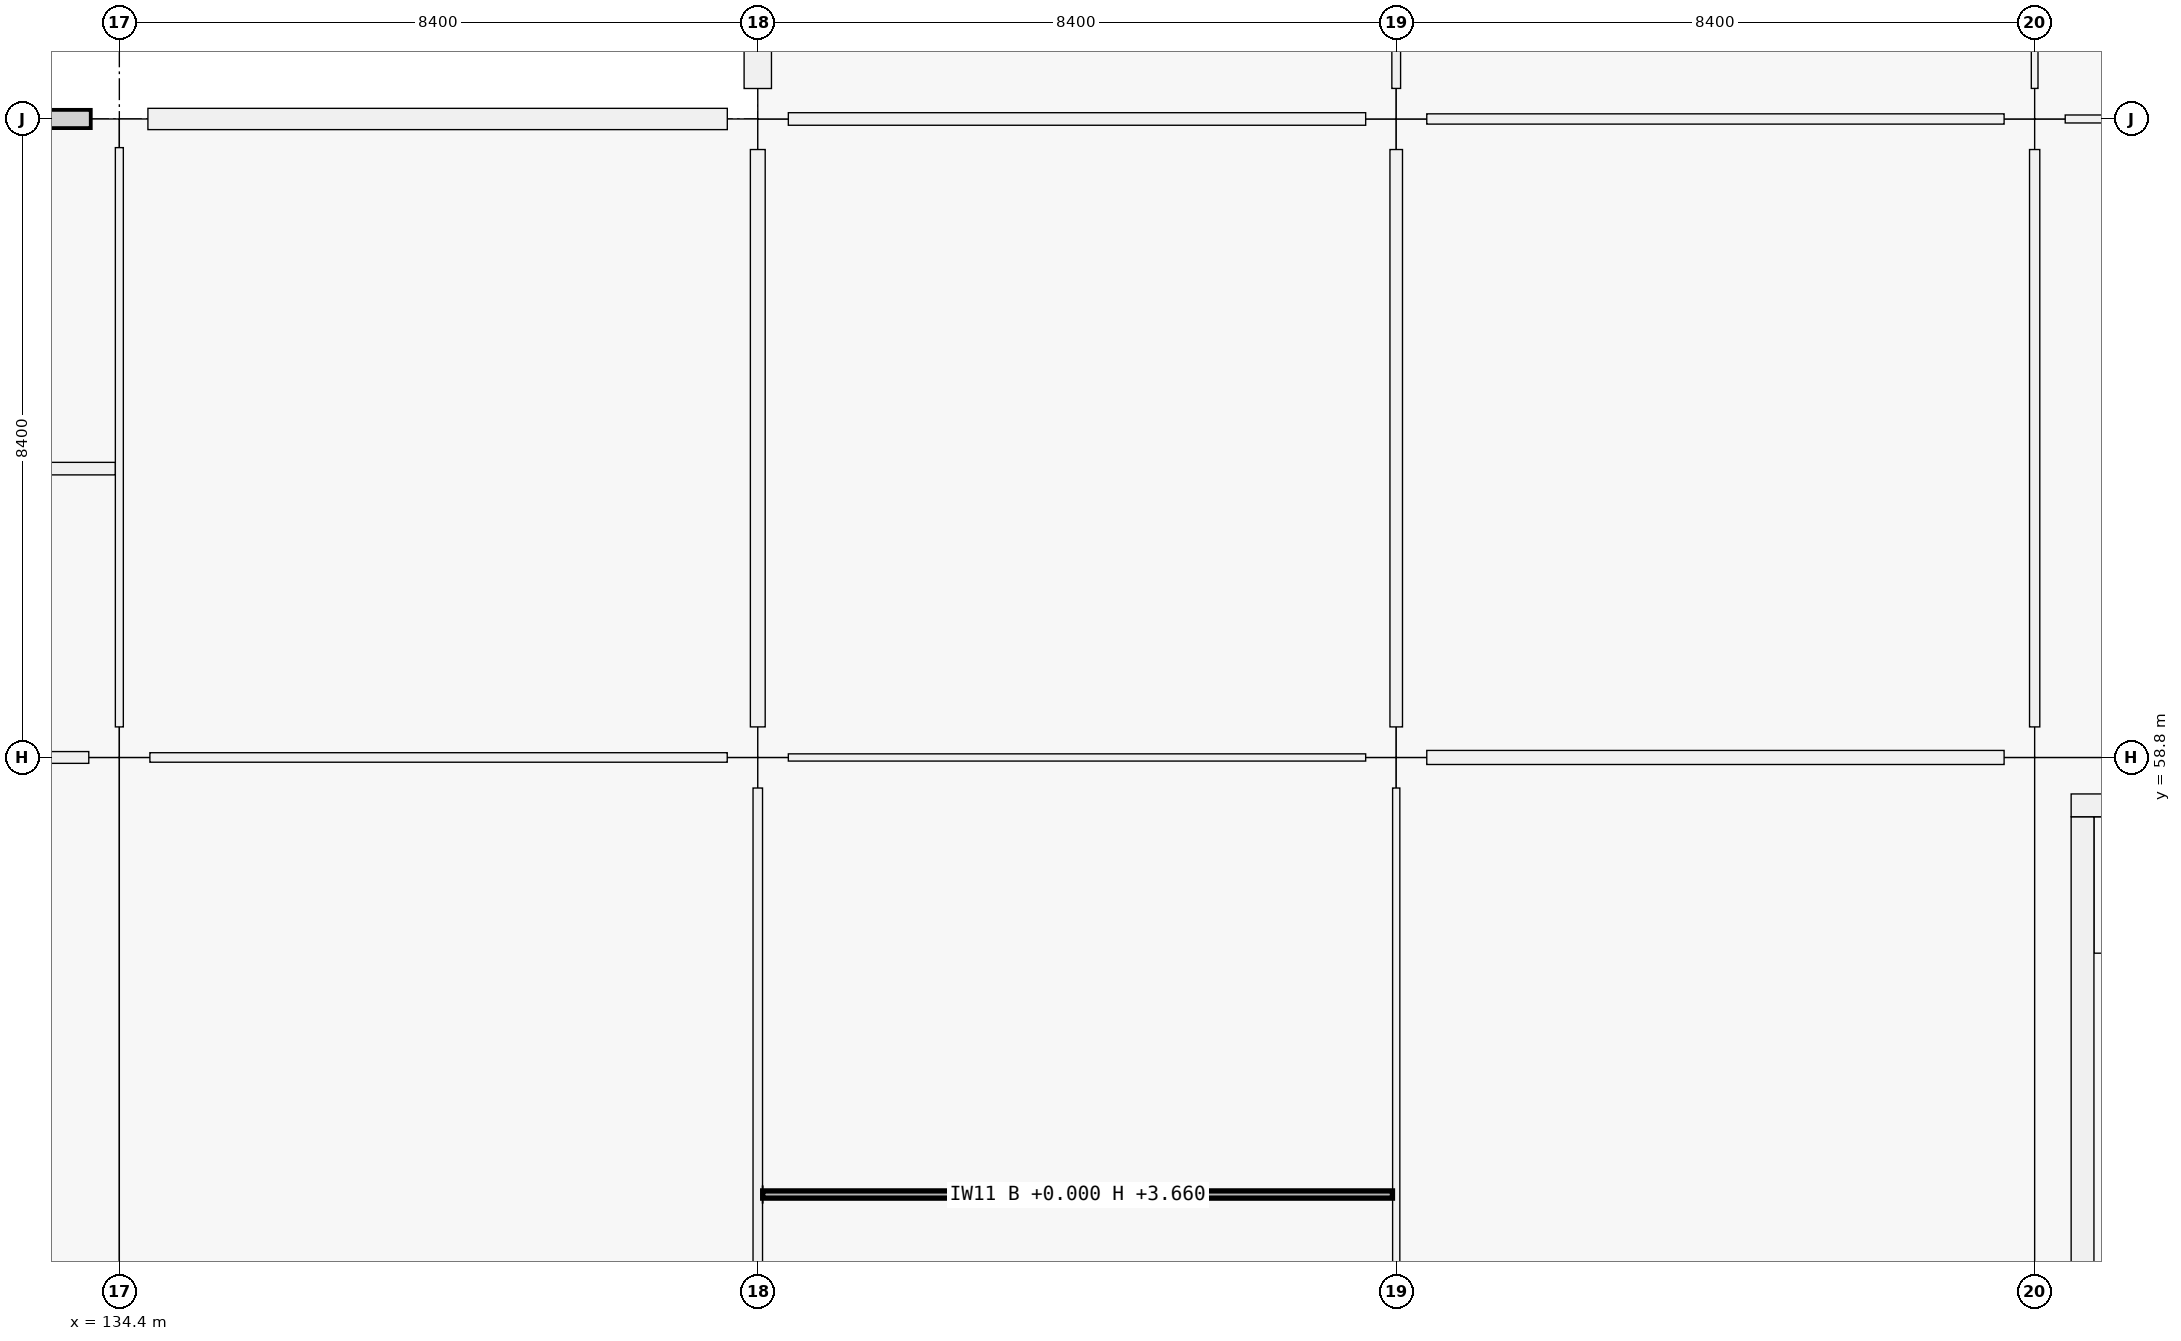
"""IFC4 building model, lengths in metres.
Left out: names, types, materials, properties, quantities, classifications, styles, units other than length and angle.
Written with IfcOpenShell. Run it as: python <this file> out.ifc"""

import sys

from ifc_helpers import new_model, si_unit, direction, frame, frame_2d, origin, origin_2d, place, context, subcontext, project, spatial, rectangle, extrude, element, fill, save


model = new_model("IFC4")
c1 = context("Model", 3, precision=1e-05, world=origin(), true_north=direction((0.0, 1.0)))
c2 = subcontext(c1, "Body", "Model", "MODEL_VIEW")
j1 = project(units=[si_unit("LENGTHUNIT", "METRE"), si_unit("PLANEANGLEUNIT", "RADIAN")], contexts=[c1])
p1 = place(None, origin())
s1 = spatial("IfcSite", under=j1, at=p1, CompositionType="ELEMENT")
p2 = place(p1, origin())
s2 = spatial("IfcBuilding", under=s1, at=p2, CompositionType="ELEMENT")
p3 = place(p2, origin())
s3 = spatial("IfcBuildingStorey", under=s2, at=p3, CompositionType="ELEMENT", Elevation=0.0)
p4 = place(p3, frame((134.4, 58.8, 0.0), z_axis=(0.0, 0.0, 1.0), x_axis=(1.0, 0.0, 0.0)))
e1 = element("IfcColumn", 1, at=p4, inside=s3, PredefinedType="COLUMN", context=c2, shape_type="SweptSolid", body=[
    extrude(rectangle(XDim=0.8, YDim=0.8, at=origin_2d()), origin(), (0.0, 0.0, 1.0), 5.76),
])
p5 = place(p3, frame((134.4, 67.2, 0.0), z_axis=(0.0, 0.0, 1.0), x_axis=(1.0, 0.0, 0.0)))
e2 = element("IfcColumn", 2, at=p5, inside=s3, PredefinedType="COLUMN", context=c2, shape_type="SweptSolid", body=[
    extrude(rectangle(XDim=0.75, YDim=0.75, at=origin_2d()), origin(), (0.0, 0.0, 1.0), 5.76),
])
for number, where, z_axis, x_axis in (
    (3, (142.8, 58.8, 0.0), (0.0, 0.0, 1.0), (1.0, 0.0, 0.0)),
    (4, (142.8, 67.2, 0.0), (0.0, 0.0, 1.0), (1.0, 0.0, 0.0)),
    (5, (151.2, 58.8, 0.0), (0.0, 0.0, 1.0), (1.0, 0.0, 0.0)),
    (6, (151.2, 67.2, 0.0), (0.0, 0.0, 1.0), (1.0, 0.0, 0.0)),
    (7, (159.6, 58.8, 0.0), (0.0, 0.0, 1.0), (1.0, 0.0, 0.0)),
    (8, (159.6, 67.2, 0.0), (0.0, 0.0, 1.0), (1.0, 0.0, 0.0)),
):
    element("IfcColumn", number, at=place(p3, frame(where, z_axis=z_axis, x_axis=x_axis)), inside=s3, PredefinedType="COLUMN", context=c2, shape_type="SweptSolid", body=[
        extrude(rectangle(XDim=0.8, YDim=0.8, at=origin_2d()), origin(), (0.0, 0.0, 1.0), 5.76),
    ])
p6 = place(p3, frame((134.776, 67.2, 0.0), z_axis=(0.0, 0.0, 1.0), x_axis=(1.0, 0.0, 0.0)))
e9 = element("IfcWall", 9, at=p6, inside=s3, PredefinedType="SOLIDWALL", context=c2, shape_type="SweptSolid", body=[
    extrude(rectangle(XDim=7.623, YDim=0.28, at=frame_2d((3.812, 0.0))), origin(), (0.0, 0.0, 1.0), 4.7),
])
p7 = place(p6, frame((2.537, 0.0, 0.9)))
e10 = element("IfcOpeningElement", 10, at=p7, cuts=e9, PredefinedType="OPENING", context=c2, shape_type="SweptSolid", body=[
    extrude(rectangle(XDim=2.55, YDim=1.95, at=frame_2d((1.275, 0.975))), frame((0.0, 0.14, 0.0), z_axis=(0.0, -1.0, 0.0), x_axis=(1.0, 0.0, 0.0)), (0.0, 0.0, 1.0), 0.28),
])
p8 = place(p3, frame((142.8, 67.601, 0.0), z_axis=(0.0, 0.0, 1.0), x_axis=(0.0, 1.0, 0.0)))
e11 = element("IfcWall", 11, at=p8, inside=s3, PredefinedType="SOLIDWALL", context=c2, shape_type="SweptSolid", body=[
    extrude(rectangle(XDim=7.673, YDim=0.36, at=frame_2d((3.836, 0.0))), origin(), (0.0, 0.0, 1.0), 4.7),
])
p9 = place(p8, frame((2.937, 0.0, 0.9)))
e12 = element("IfcOpeningElement", 12, at=p9, cuts=e11, PredefinedType="OPENING", context=c2, shape_type="SweptSolid", body=[
    extrude(rectangle(XDim=1.8, YDim=1.8, at=frame_2d((0.9, 0.9))), frame((0.0, 0.18, 0.0), z_axis=(0.0, -1.0, 0.0), x_axis=(1.0, 0.0, 0.0)), (0.0, 0.0, 1.0), 0.36),
])
p10 = place(p3, frame((160.23, 51.18, 0.0), z_axis=(0.0, 0.0, 1.0), x_axis=(0.0, 1.0, 0.0)))
e13 = element("IfcWall", 13, at=p10, inside=s3, PredefinedType="SHEAR", context=c2, shape_type="SweptSolid", body=[
    extrude(rectangle(XDim=6.84, YDim=0.3, at=frame_2d((3.42, 0.0))), origin(), (0.0, 0.0, 1.0), 5.76),
])
p11 = place(p3, frame((160.08, 58.17, 0.0), z_axis=(0.0, 0.0, 1.0), x_axis=(1.0, 0.0, 0.0)))
e14 = element("IfcWall", 14, at=p11, inside=s3, PredefinedType="SHEAR", context=c2, shape_type="SweptSolid", body=[
    extrude(rectangle(XDim=7.44, YDim=0.3, at=frame_2d((3.72, 0.0))), origin(), (0.0, 0.0, 1.0), 5.76),
])
p12 = place(p3, frame((126.402, 58.8, 0.0), z_axis=(0.0, 0.0, 1.0), x_axis=(1.0, 0.0, 0.0)))
e15 = element("IfcWall", 15, at=p12, inside=s3, PredefinedType="PARTITIONING", context=c2, shape_type="SweptSolid", body=[
    extrude(rectangle(XDim=7.596, YDim=0.155, at=frame_2d((3.798, 0.0))), origin(), (0.0, 0.0, 1.0), 3.66),
])
p13 = place(p3, frame((134.802, 58.8, 0.0), z_axis=(0.0, 0.0, 1.0), x_axis=(1.0, 0.0, 0.0)))
e16 = element("IfcWall", 16, at=p13, inside=s3, PredefinedType="PARTITIONING", context=c2, shape_type="SweptSolid", body=[
    extrude(rectangle(XDim=7.596, YDim=0.125, at=frame_2d((3.798, 0.0))), origin(), (0.0, 0.0, 1.0), 3.66),
])
p14 = place(p13, frame((3.293, 0.0, 0.0)))
e17 = element("IfcOpeningElement", 17, at=p14, cuts=e16, PredefinedType="OPENING", context=c2, shape_type="SweptSolid", body=[
    extrude(rectangle(XDim=1.01, YDim=2.12, at=frame_2d((0.505, 1.06))), frame((0.0, 0.062, 0.0), z_axis=(0.0, -1.0, 0.0), x_axis=(1.0, 0.0, 0.0)), (0.0, 0.0, 1.0), 0.125),
])
p15 = place(p3, frame((143.202, 58.8, 0.0), z_axis=(0.0, 0.0, 1.0), x_axis=(1.0, 0.0, 0.0)))
e18 = element("IfcWall", 18, at=p15, inside=s3, PredefinedType="PARTITIONING", context=c2, shape_type="SweptSolid", body=[
    extrude(rectangle(XDim=7.596, YDim=0.095, at=frame_2d((3.798, 0.0))), origin(), (0.0, 0.0, 1.0), 3.66),
])
p16 = place(p3, frame((143.202, 67.2, 0.0), z_axis=(0.0, 0.0, 1.0), x_axis=(1.0, 0.0, 0.0)))
e19 = element("IfcWall", 19, at=p16, inside=s3, PredefinedType="PARTITIONING", context=c2, shape_type="SweptSolid", body=[
    extrude(rectangle(XDim=7.596, YDim=0.165, at=frame_2d((3.798, 0.0))), origin(), (0.0, 0.0, 1.0), 3.66),
])
p17 = place(p16, frame((3.278, 0.0, 0.0)))
e20 = element("IfcOpeningElement", 20, at=p17, cuts=e19, PredefinedType="OPENING", context=c2, shape_type="SweptSolid", body=[
    extrude(rectangle(XDim=1.04, YDim=2.2, at=frame_2d((0.52, 1.1))), frame((0.0, 0.083, 0.0), z_axis=(0.0, -1.0, 0.0), x_axis=(1.0, 0.0, 0.0)), (0.0, 0.0, 1.0), 0.165),
])
p18 = place(p3, frame((151.602, 58.8, 0.0), z_axis=(0.0, 0.0, 1.0), x_axis=(1.0, 0.0, 0.0)))
e21 = element("IfcWall", 21, at=p18, inside=s3, PredefinedType="PARTITIONING", context=c2, shape_type="SweptSolid", body=[
    extrude(rectangle(XDim=7.596, YDim=0.185, at=frame_2d((3.798, 0.0))), origin(), (0.0, 0.0, 1.0), 3.66),
])
p19 = place(p18, frame((3.318, 0.0, 0.0)))
e22 = element("IfcOpeningElement", 22, at=p19, cuts=e21, PredefinedType="OPENING", context=c2, shape_type="SweptSolid", body=[
    extrude(rectangle(XDim=0.96, YDim=2.18, at=frame_2d((0.48, 1.09))), frame((0.0, 0.093, 0.0), z_axis=(0.0, -1.0, 0.0), x_axis=(1.0, 0.0, 0.0)), (0.0, 0.0, 1.0), 0.185),
])
p20 = place(p3, frame((151.602, 67.2, 0.0), z_axis=(0.0, 0.0, 1.0), x_axis=(1.0, 0.0, 0.0)))
e23 = element("IfcWall", 23, at=p20, inside=s3, PredefinedType="PARTITIONING", context=c2, shape_type="SweptSolid", body=[
    extrude(rectangle(XDim=7.596, YDim=0.135, at=frame_2d((3.798, 0.0))), origin(), (0.0, 0.0, 1.0), 3.66),
])
p21 = place(p20, frame((3.328, 0.0, 0.0)))
e24 = element("IfcOpeningElement", 24, at=p21, cuts=e23, PredefinedType="OPENING", context=c2, shape_type="SweptSolid", body=[
    extrude(rectangle(XDim=0.94, YDim=2.15, at=frame_2d((0.47, 1.075))), frame((0.0, 0.067, 0.0), z_axis=(0.0, -1.0, 0.0), x_axis=(1.0, 0.0, 0.0)), (0.0, 0.0, 1.0), 0.135),
])
p22 = place(p3, frame((160.002, 67.2, 0.0), z_axis=(0.0, 0.0, 1.0), x_axis=(1.0, 0.0, 0.0)))
e25 = element("IfcWall", 25, at=p22, inside=s3, PredefinedType="PARTITIONING", context=c2, shape_type="SweptSolid", body=[
    extrude(rectangle(XDim=7.596, YDim=0.105, at=frame_2d((3.798, 0.0))), origin(), (0.0, 0.0, 1.0), 3.66),
])
p23 = place(p22, frame((3.273, 0.0, 0.0)))
e26 = element("IfcOpeningElement", 26, at=p23, cuts=e25, PredefinedType="OPENING", context=c2, shape_type="SweptSolid", body=[
    extrude(rectangle(XDim=1.05, YDim=2.12, at=frame_2d((0.525, 1.06))), frame((0.0, 0.052, 0.0), z_axis=(0.0, -1.0, 0.0), x_axis=(1.0, 0.0, 0.0)), (0.0, 0.0, 1.0), 0.105),
])
p24 = place(p3, frame((134.4, 59.202, 0.0), z_axis=(0.0, 0.0, 1.0), x_axis=(0.0, 1.0, 0.0)))
e27 = element("IfcWall", 27, at=p24, inside=s3, PredefinedType="PARTITIONING", context=c2, shape_type="SweptSolid", body=[
    extrude(rectangle(XDim=7.621, YDim=0.105, at=frame_2d((3.811, 0.0))), origin(), (0.0, 0.0, 1.0), 3.66),
])
p25 = place(p3, frame((142.8, 50.802, 0.0), z_axis=(0.0, 0.0, 1.0), x_axis=(0.0, 1.0, 0.0)))
e28 = element("IfcWall", 28, at=p25, inside=s3, PredefinedType="PARTITIONING", context=c2, shape_type="SweptSolid", body=[
    extrude(rectangle(XDim=7.596, YDim=0.125, at=frame_2d((3.798, 0.0))), origin(), (0.0, 0.0, 1.0), 3.66),
])
p26 = place(p25, frame((0.593, 0.0, 0.0)))
e29 = element("IfcOpeningElement", 29, at=p26, cuts=e28, PredefinedType="OPENING", context=c2, shape_type="SweptSolid", body=[
    extrude(rectangle(XDim=0.94, YDim=2.08, at=frame_2d((0.47, 1.04))), frame((0.0, 0.062, 0.0), z_axis=(0.0, -1.0, 0.0), x_axis=(1.0, 0.0, 0.0)), (0.0, 0.0, 1.0), 0.125),
])
p27 = place(p25, frame((4.503, 0.0, 0.0)))
e30 = element("IfcOpeningElement", 30, at=p27, cuts=e28, PredefinedType="OPENING", context=c2, shape_type="SweptSolid", body=[
    extrude(rectangle(XDim=0.96, YDim=2.1, at=frame_2d((0.48, 1.05))), frame((0.0, 0.062, 0.0), z_axis=(0.0, -1.0, 0.0), x_axis=(1.0, 0.0, 0.0)), (0.0, 0.0, 1.0), 0.125),
])
p28 = place(p3, frame((142.8, 59.202, 0.0), z_axis=(0.0, 0.0, 1.0), x_axis=(0.0, 1.0, 0.0)))
e31 = element("IfcWall", 31, at=p28, inside=s3, PredefinedType="PARTITIONING", context=c2, shape_type="SweptSolid", body=[
    extrude(rectangle(XDim=7.596, YDim=0.195, at=frame_2d((3.798, 0.0))), origin(), (0.0, 0.0, 1.0), 3.66),
])
p29 = place(p28, frame((3.268, 0.0, 0.0)))
e32 = element("IfcOpeningElement", 32, at=p29, cuts=e31, PredefinedType="OPENING", context=c2, shape_type="SweptSolid", body=[
    extrude(rectangle(XDim=1.06, YDim=2.25, at=frame_2d((0.53, 1.125))), frame((0.0, 0.098, 0.0), z_axis=(0.0, -1.0, 0.0), x_axis=(1.0, 0.0, 0.0)), (0.0, 0.0, 1.0), 0.195),
])
p30 = place(p3, frame((151.2, 50.802, 0.0), z_axis=(0.0, 0.0, 1.0), x_axis=(0.0, 1.0, 0.0)))
e33 = element("IfcWall", 33, at=p30, inside=s3, PredefinedType="PARTITIONING", context=c2, shape_type="SweptSolid", body=[
    extrude(rectangle(XDim=7.596, YDim=0.095, at=frame_2d((3.798, 0.0))), origin(), (0.0, 0.0, 1.0), 3.66),
])
p31 = place(p3, frame((151.2, 59.202, 0.0), z_axis=(0.0, 0.0, 1.0), x_axis=(0.0, 1.0, 0.0)))
e34 = element("IfcWall", 34, at=p31, inside=s3, PredefinedType="PARTITIONING", context=c2, shape_type="SweptSolid", body=[
    extrude(rectangle(XDim=7.596, YDim=0.165, at=frame_2d((3.798, 0.0))), origin(), (0.0, 0.0, 1.0), 3.66),
])
p32 = place(p31, frame((3.318, 0.0, 0.0)))
e35 = element("IfcOpeningElement", 35, at=p32, cuts=e34, PredefinedType="OPENING", context=c2, shape_type="SweptSolid", body=[
    extrude(rectangle(XDim=0.96, YDim=2.18, at=frame_2d((0.48, 1.09))), frame((0.0, 0.083, 0.0), z_axis=(0.0, -1.0, 0.0), x_axis=(1.0, 0.0, 0.0)), (0.0, 0.0, 1.0), 0.165),
])
p33 = place(p3, frame((151.2, 67.602, 0.0), z_axis=(0.0, 0.0, 1.0), x_axis=(0.0, 1.0, 0.0)))
e36 = element("IfcWall", 36, at=p33, inside=s3, PredefinedType="PARTITIONING", context=c2, shape_type="SweptSolid", body=[
    extrude(rectangle(XDim=7.696, YDim=0.115, at=frame_2d((3.848, 0.0))), origin(), (0.0, 0.0, 1.0), 3.66),
])
p34 = place(p33, frame((3.378, 0.0, 0.0)))
e37 = element("IfcOpeningElement", 37, at=p34, cuts=e36, PredefinedType="OPENING", context=c2, shape_type="SweptSolid", body=[
    extrude(rectangle(XDim=0.94, YDim=2.15, at=frame_2d((0.47, 1.075))), frame((0.0, 0.058, 0.0), z_axis=(0.0, -1.0, 0.0), x_axis=(1.0, 0.0, 0.0)), (0.0, 0.0, 1.0), 0.115),
])
p35 = place(p3, frame((159.6, 59.202, 0.0), z_axis=(0.0, 0.0, 1.0), x_axis=(0.0, 1.0, 0.0)))
e38 = element("IfcWall", 38, at=p35, inside=s3, PredefinedType="PARTITIONING", context=c2, shape_type="SweptSolid", body=[
    extrude(rectangle(XDim=7.596, YDim=0.135, at=frame_2d((3.798, 0.0))), origin(), (0.0, 0.0, 1.0), 3.66),
])
p36 = place(p35, frame((3.288, 0.0, 0.0)))
e39 = element("IfcOpeningElement", 39, at=p36, cuts=e38, PredefinedType="OPENING", context=c2, shape_type="SweptSolid", body=[
    extrude(rectangle(XDim=1.02, YDim=2.2, at=frame_2d((0.51, 1.1))), frame((0.0, 0.067, 0.0), z_axis=(0.0, -1.0, 0.0), x_axis=(1.0, 0.0, 0.0)), (0.0, 0.0, 1.0), 0.135),
])
p37 = place(p3, frame((159.6, 67.602, 0.0), z_axis=(0.0, 0.0, 1.0), x_axis=(0.0, 1.0, 0.0)))
e40 = element("IfcWall", 40, at=p37, inside=s3, PredefinedType="PARTITIONING", context=c2, shape_type="SweptSolid", body=[
    extrude(rectangle(XDim=7.671, YDim=0.088, at=frame_2d((3.835, 0.0))), origin(), (0.0, 0.0, 1.0), 3.66),
])
p38 = place(p37, frame((3.331, 0.0, 0.0)))
e41 = element("IfcOpeningElement", 41, at=p38, cuts=e40, PredefinedType="OPENING", context=c2, shape_type="SweptSolid", body=[
    extrude(rectangle(XDim=1.01, YDim=2.12, at=frame_2d((0.505, 1.06))), frame((0.0, 0.044, 0.0), z_axis=(0.0, -1.0, 0.0), x_axis=(1.0, 0.0, 0.0)), (0.0, 0.0, 1.0), 0.088),
])
p39 = place(p3, frame((126.07, 62.6, 0.0), z_axis=(0.0, 0.0, 1.0), x_axis=(1.0, 0.0, 0.0)))
e42 = element("IfcWall", 42, at=p39, inside=s3, PredefinedType="PARTITIONING", context=c2, shape_type="SweptSolid", body=[
    extrude(rectangle(XDim=8.276, YDim=0.165, at=frame_2d((4.138, 0.0))), origin(), (0.0, 0.0, 1.0), 3.66),
])
p40 = place(p3, frame((142.865, 53.05, 0.0), z_axis=(0.0, 0.0, 1.0), x_axis=(1.0, 0.0, 0.0)))
e43 = element("IfcWall", 43, at=p40, inside=s3, PredefinedType="PARTITIONING", context=c2, shape_type="SweptSolid", body=[
    extrude(rectangle(XDim=8.286, YDim=0.095, at=frame_2d((4.143, 0.0))), origin(), (0.0, 0.0, 1.0), 3.66),
])
p41 = place(p7, origin())
e44 = element("IfcWindow", 44, at=p41, inside=s3, PartitioningType="SINGLE_PANEL", PredefinedType="WINDOW", context=c2, shape_type="SweptSolid", body=[
    extrude(rectangle(XDim=2.55, YDim=1.95, at=frame_2d((1.275, 0.975))), frame((0.0, 0.03, 0.0), z_axis=(0.0, -1.0, 0.0), x_axis=(1.0, 0.0, 0.0)), (0.0, 0.0, 1.0), 0.06),
])
fill(e10, e44)
p42 = place(p26, origin())
e45 = element("IfcDoor", 45, at=p42, inside=s3, OperationType="SINGLE_SWING_LEFT", PredefinedType="DOOR", context=c2, shape_type="SweptSolid", body=[
    extrude(rectangle(XDim=0.94, YDim=2.08, at=frame_2d((0.47, 1.04))), frame((0.0, 0.025, 0.0), z_axis=(0.0, -1.0, 0.0), x_axis=(1.0, 0.0, 0.0)), (0.0, 0.0, 1.0), 0.05),
])
fill(e29, e45)
p43 = place(p27, origin())
e46 = element("IfcDoor", 46, at=p43, inside=s3, OperationType="SINGLE_SWING_RIGHT", PredefinedType="DOOR", context=c2, shape_type="SweptSolid", body=[
    extrude(rectangle(XDim=0.96, YDim=2.1, at=frame_2d((0.48, 1.05))), frame((0.0, 0.025, 0.0), z_axis=(0.0, -1.0, 0.0), x_axis=(1.0, 0.0, 0.0)), (0.0, 0.0, 1.0), 0.05),
])
fill(e30, e46)
p44 = place(p14, origin())
e47 = element("IfcDoor", 47, at=p44, inside=s3, OperationType="SINGLE_SWING_LEFT", PredefinedType="DOOR", context=c2, shape_type="SweptSolid", body=[
    extrude(rectangle(XDim=1.01, YDim=2.12, at=frame_2d((0.505, 1.06))), frame((0.0, 0.025, 0.0), z_axis=(0.0, -1.0, 0.0), x_axis=(1.0, 0.0, 0.0)), (0.0, 0.0, 1.0), 0.05),
])
fill(e17, e47)
p45 = place(p17, origin())
e48 = element("IfcDoor", 48, at=p45, inside=s3, OperationType="SINGLE_SWING_LEFT", PredefinedType="DOOR", context=c2, shape_type="SweptSolid", body=[
    extrude(rectangle(XDim=1.04, YDim=2.2, at=frame_2d((0.52, 1.1))), frame((0.0, 0.025, 0.0), z_axis=(0.0, -1.0, 0.0), x_axis=(1.0, 0.0, 0.0)), (0.0, 0.0, 1.0), 0.05),
])
fill(e20, e48)
p46 = place(p19, origin())
e49 = element("IfcDoor", 49, at=p46, inside=s3, OperationType="SINGLE_SWING_LEFT", PredefinedType="DOOR", context=c2, shape_type="SweptSolid", body=[
    extrude(rectangle(XDim=0.96, YDim=2.18, at=frame_2d((0.48, 1.09))), frame((0.0, 0.025, 0.0), z_axis=(0.0, -1.0, 0.0), x_axis=(1.0, 0.0, 0.0)), (0.0, 0.0, 1.0), 0.05),
])
fill(e22, e49)
p47 = place(p21, origin())
e50 = element("IfcDoor", 50, at=p47, inside=s3, OperationType="SINGLE_SWING_RIGHT", PredefinedType="DOOR", context=c2, shape_type="SweptSolid", body=[
    extrude(rectangle(XDim=0.94, YDim=2.15, at=frame_2d((0.47, 1.075))), frame((0.0, 0.025, 0.0), z_axis=(0.0, -1.0, 0.0), x_axis=(1.0, 0.0, 0.0)), (0.0, 0.0, 1.0), 0.05),
])
fill(e24, e50)
p48 = place(p29, origin())
e51 = element("IfcDoor", 51, at=p48, inside=s3, OperationType="SINGLE_SWING_LEFT", PredefinedType="DOOR", context=c2, shape_type="SweptSolid", body=[
    extrude(rectangle(XDim=1.06, YDim=2.25, at=frame_2d((0.53, 1.125))), frame((0.0, 0.025, 0.0), z_axis=(0.0, -1.0, 0.0), x_axis=(1.0, 0.0, 0.0)), (0.0, 0.0, 1.0), 0.05),
])
fill(e32, e51)
p49 = place(p36, origin())
e52 = element("IfcDoor", 52, at=p49, inside=s3, OperationType="SINGLE_SWING_LEFT", PredefinedType="DOOR", context=c2, shape_type="SweptSolid", body=[
    extrude(rectangle(XDim=1.02, YDim=2.2, at=frame_2d((0.51, 1.1))), frame((0.0, 0.025, 0.0), z_axis=(0.0, -1.0, 0.0), x_axis=(1.0, 0.0, 0.0)), (0.0, 0.0, 1.0), 0.05),
])
fill(e39, e52)
p50 = place(p32, origin())
e53 = element("IfcDoor", 53, at=p50, inside=s3, OperationType="SINGLE_SWING_RIGHT", PredefinedType="DOOR", context=c2, shape_type="SweptSolid", body=[
    extrude(rectangle(XDim=0.96, YDim=2.18, at=frame_2d((0.48, 1.09))), frame((0.0, 0.025, 0.0), z_axis=(0.0, -1.0, 0.0), x_axis=(1.0, 0.0, 0.0)), (0.0, 0.0, 1.0), 0.05),
])
fill(e35, e53)
save(model, sys.argv[1])
